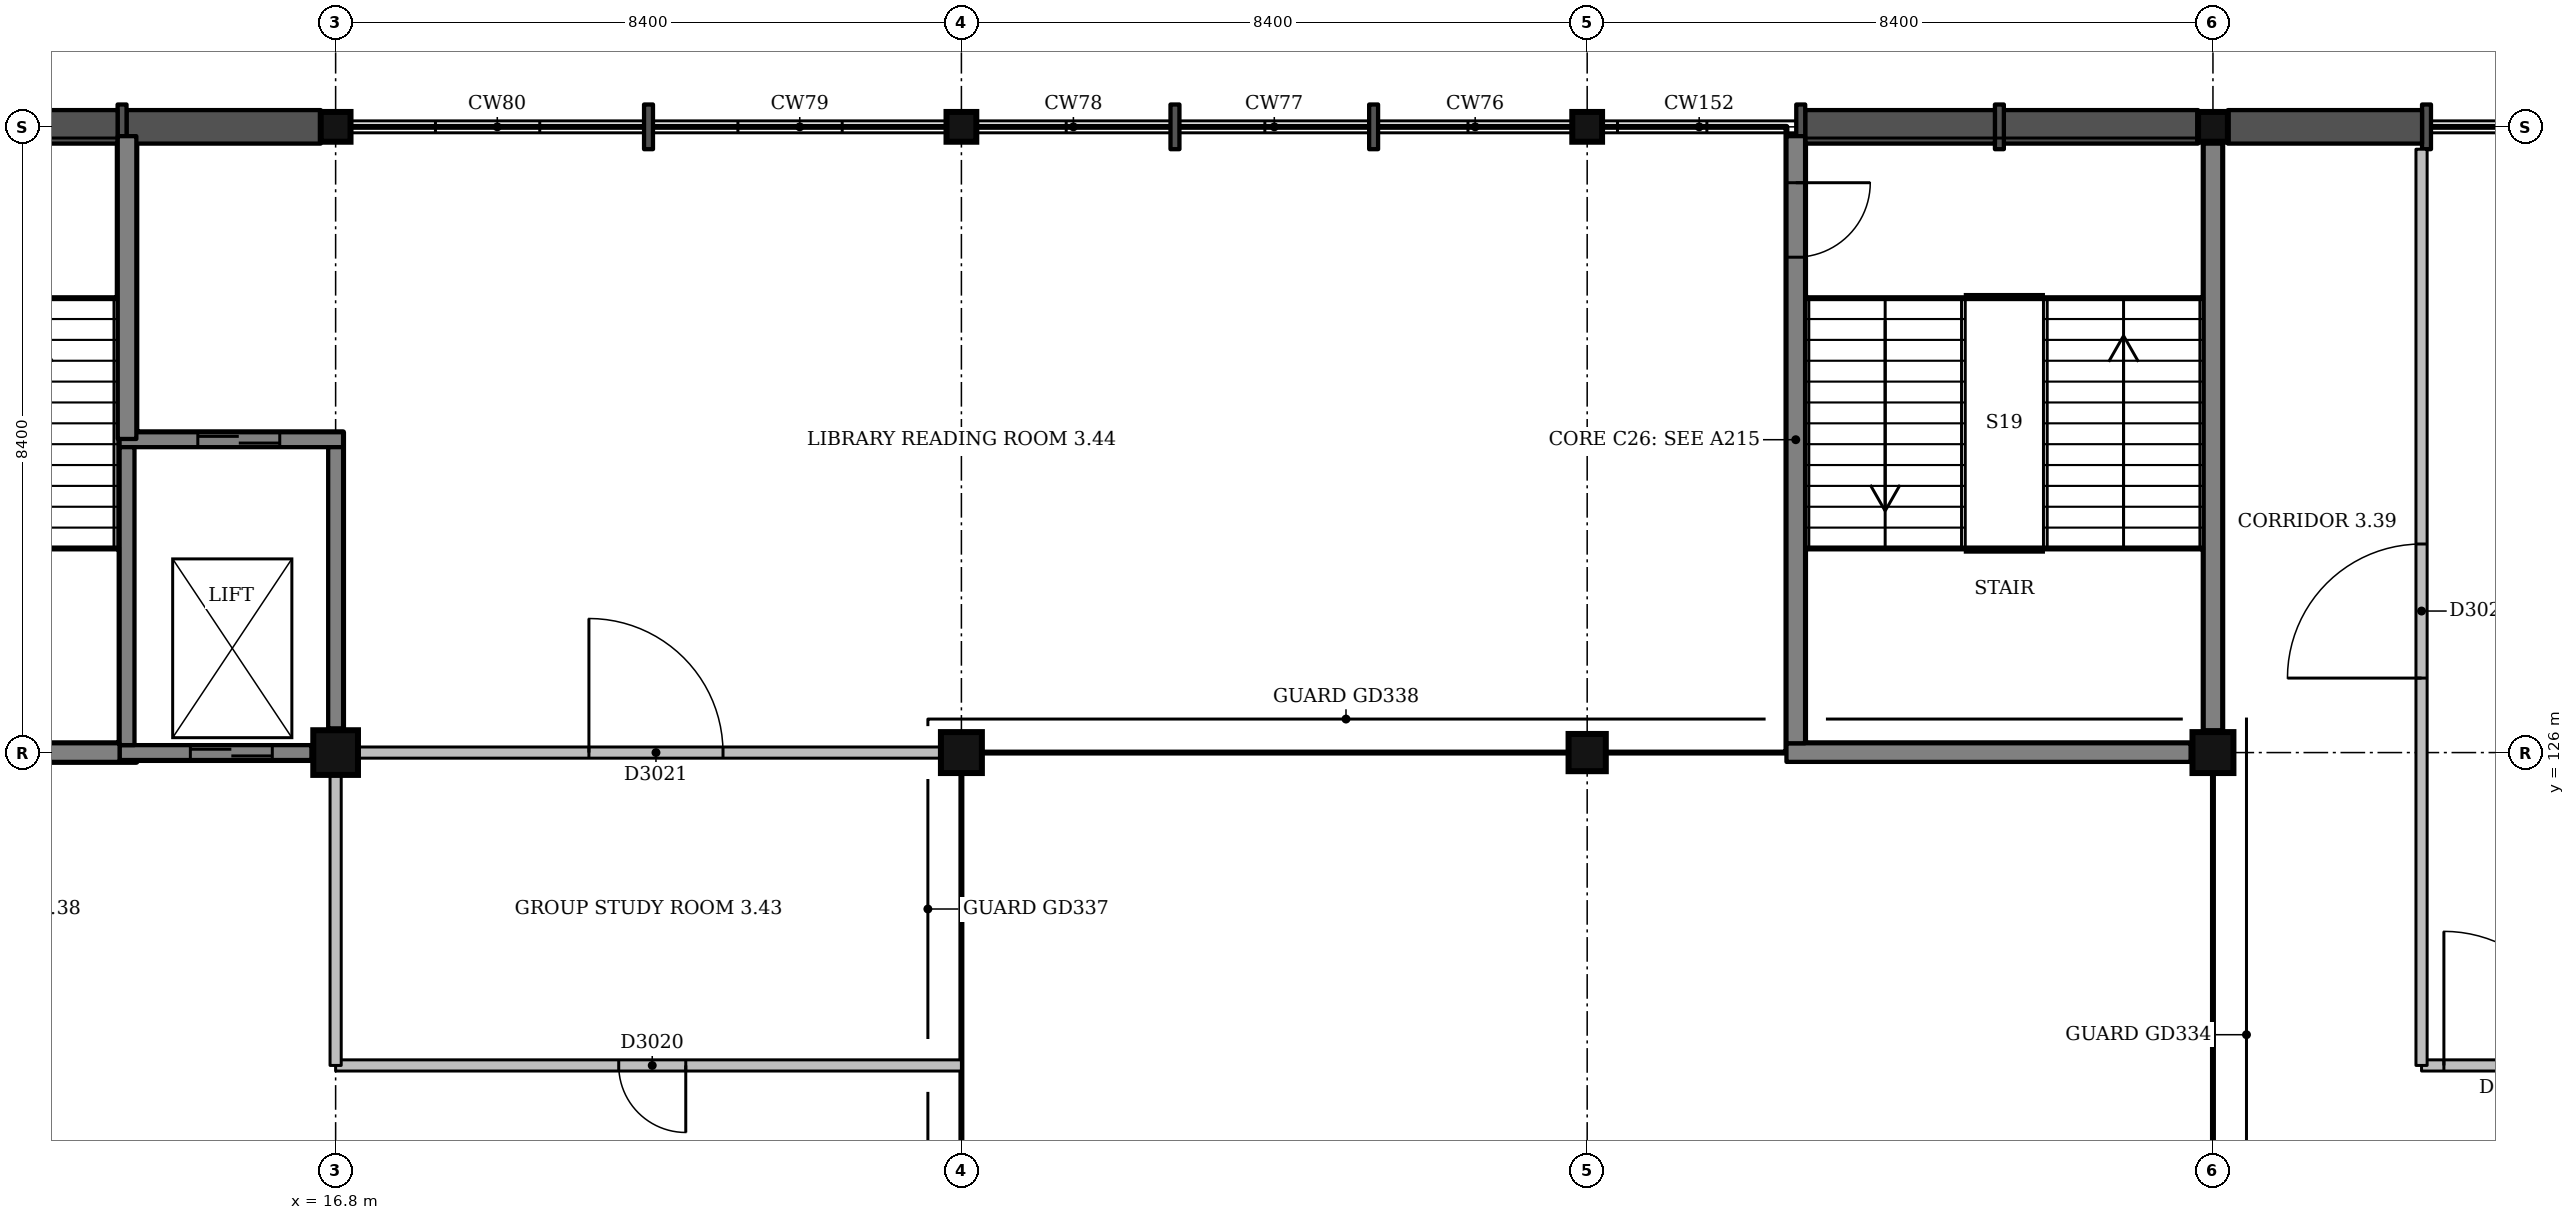
"""IFC4 building model, lengths in metres.
Left out: names, types, materials, properties, quantities, classifications, styles, units other than length and angle.
Written with IfcOpenShell. Run it as: python <this file> out.ifc"""

import sys

from ifc_helpers import new_model, si_unit, direction, frame, frame_2d, origin, origin_2d, place, context, subcontext, project, spatial, rectangle, extrude, element, fill, save


model = new_model("IFC4")
c1 = context("Model", 3, precision=1e-05, world=origin(), true_north=direction((0.0, 1.0)))
c2 = subcontext(c1, "Body", "Model", "MODEL_VIEW")
j1 = project(units=[si_unit("LENGTHUNIT", "METRE"), si_unit("PLANEANGLEUNIT", "RADIAN")], contexts=[c1])
p1 = place(None, origin())
s1 = spatial("IfcSite", under=j1, at=p1, CompositionType="ELEMENT")
p2 = place(p1, origin())
s2 = spatial("IfcBuilding", under=s1, at=p2, CompositionType="ELEMENT")
p3 = place(p2, frame((0.0, 0.0, 13.5)))
s3 = spatial("IfcBuildingStorey", under=s2, at=p3, CompositionType="ELEMENT", Elevation=13.5)
p4 = place(p3, frame((16.8, 126.0, 0.0), z_axis=(0.0, 0.0, 1.0), x_axis=(1.0, 0.0, 0.0)))
e1 = element("IfcColumn", 1, at=p4, inside=s3, PredefinedType="COLUMN", context=c2, shape_type="SweptSolid", body=[
    extrude(rectangle(XDim=0.6, YDim=0.6, at=origin_2d()), origin(), (0.0, 0.0, 1.0), 4.5),
])
p5 = place(p3, frame((16.8, 134.4, 0.0), z_axis=(0.0, 0.0, 1.0), x_axis=(1.0, 0.0, 0.0)))
e2 = element("IfcColumn", 2, at=p5, inside=s3, PredefinedType="COLUMN", context=c2, shape_type="SweptSolid", body=[
    extrude(rectangle(XDim=0.4, YDim=0.4, at=origin_2d()), origin(), (0.0, 0.0, 1.0), 4.5),
])
p6 = place(p3, frame((25.2, 126.0, 0.0), z_axis=(0.0, 0.0, 1.0), x_axis=(1.0, 0.0, 0.0)))
e3 = element("IfcColumn", 3, at=p6, inside=s3, PredefinedType="COLUMN", context=c2, shape_type="SweptSolid", body=[
    extrude(rectangle(XDim=0.55, YDim=0.55, at=origin_2d()), origin(), (0.0, 0.0, 1.0), 4.5),
])
p7 = place(p3, frame((25.2, 134.4, 0.0), z_axis=(0.0, 0.0, 1.0), x_axis=(1.0, 0.0, 0.0)))
e4 = element("IfcColumn", 4, at=p7, inside=s3, PredefinedType="COLUMN", context=c2, shape_type="SweptSolid", body=[
    extrude(rectangle(XDim=0.4, YDim=0.4, at=origin_2d()), origin(), (0.0, 0.0, 1.0), 4.5),
])
p8 = place(p3, frame((33.6, 126.0, 0.0), z_axis=(0.0, 0.0, 1.0), x_axis=(1.0, 0.0, 0.0)))
e5 = element("IfcColumn", 5, at=p8, inside=s3, PredefinedType="COLUMN", context=c2, shape_type="SweptSolid", body=[
    extrude(rectangle(XDim=0.5, YDim=0.5, at=origin_2d()), origin(), (0.0, 0.0, 1.0), 4.5),
])
p9 = place(p3, frame((33.6, 134.4, 0.0), z_axis=(0.0, 0.0, 1.0), x_axis=(1.0, 0.0, 0.0)))
e6 = element("IfcColumn", 6, at=p9, inside=s3, PredefinedType="COLUMN", context=c2, shape_type="SweptSolid", body=[
    extrude(rectangle(XDim=0.4, YDim=0.4, at=origin_2d()), origin(), (0.0, 0.0, 1.0), 4.5),
])
p10 = place(p3, frame((42.0, 126.0, 0.0), z_axis=(0.0, 0.0, 1.0), x_axis=(1.0, 0.0, 0.0)))
e7 = element("IfcColumn", 7, at=p10, inside=s3, PredefinedType="COLUMN", context=c2, shape_type="SweptSolid", body=[
    extrude(rectangle(XDim=0.55, YDim=0.55, at=origin_2d()), origin(), (0.0, 0.0, 1.0), 4.5),
])
p11 = place(p3, frame((42.0, 134.4, 0.0), z_axis=(0.0, 0.0, 1.0), x_axis=(1.0, 0.0, 0.0)))
e8 = element("IfcColumn", 8, at=p11, inside=s3, PredefinedType="COLUMN", context=c2, shape_type="SweptSolid", body=[
    extrude(rectangle(XDim=0.4, YDim=0.4, at=origin_2d()), origin(), (0.0, 0.0, 1.0), 4.5),
])
p12 = place(p3, frame((13.9, 126.0, 0.0), z_axis=(0.0, 0.0, 1.0), x_axis=(1.0, 0.0, 0.0)))
e9 = element("IfcWall", 9, at=p12, inside=s3, PredefinedType="SHEAR", context=c2, shape_type="SweptSolid", body=[
    extrude(rectangle(XDim=2.575, YDim=0.2, at=frame_2d((1.288, 0.0))), origin(), (0.0, 0.0, 1.0), 4.5),
])
p13 = place(p12, frame((0.95, 0.0, 0.0)))
e10 = element("IfcOpeningElement", 10, at=p13, cuts=e9, PredefinedType="OPENING", context=c2, shape_type="SweptSolid", body=[
    extrude(rectangle(XDim=1.1, YDim=2.1, at=frame_2d((0.55, 1.05))), frame((0.0, 0.11, 0.0), z_axis=(0.0, -1.0, 0.0), x_axis=(1.0, 0.0, 0.0)), (0.0, 0.0, 1.0), 0.22),
])
p14 = place(p3, frame((13.9, 130.2, 0.0), z_axis=(0.0, 0.0, 1.0), x_axis=(1.0, 0.0, 0.0)))
e11 = element("IfcWall", 11, at=p14, inside=s3, PredefinedType="SHEAR", context=c2, shape_type="SweptSolid", body=[
    extrude(rectangle(XDim=3.0, YDim=0.2, at=frame_2d((1.5, 0.0))), origin(), (0.0, 0.0, 1.0), 4.5),
])
p15 = place(p14, frame((1.05, 0.0, 0.0)))
e12 = element("IfcOpeningElement", 12, at=p15, cuts=e11, PredefinedType="OPENING", context=c2, shape_type="SweptSolid", body=[
    extrude(rectangle(XDim=1.1, YDim=2.1, at=frame_2d((0.55, 1.05))), frame((0.0, 0.11, 0.0), z_axis=(0.0, -1.0, 0.0), x_axis=(1.0, 0.0, 0.0)), (0.0, 0.0, 1.0), 0.22),
])
p16 = place(p3, frame((14.0, 126.1, 0.0), z_axis=(0.0, 0.0, 1.0), x_axis=(0.0, 1.0, 0.0)))
e13 = element("IfcWall", 13, at=p16, inside=s3, PredefinedType="SHEAR", context=c2, shape_type="SweptSolid", body=[
    extrude(rectangle(XDim=4.0, YDim=0.2, at=frame_2d((2.0, 0.0))), origin(), (0.0, 0.0, 1.0), 4.5),
])
p17 = place(p3, frame((16.8, 126.325, 0.0), z_axis=(0.0, 0.0, 1.0), x_axis=(0.0, 1.0, 0.0)))
e14 = element("IfcWall", 14, at=p17, inside=s3, PredefinedType="SHEAR", context=c2, shape_type="SweptSolid", body=[
    extrude(rectangle(XDim=3.775, YDim=0.2, at=frame_2d((1.888, 0.0))), origin(), (0.0, 0.0, 1.0), 4.5),
])
p18 = place(p3, frame((36.275, 126.0, 0.0), z_axis=(0.0, 0.0, 1.0), x_axis=(1.0, 0.0, 0.0)))
e15 = element("IfcWall", 15, at=p18, inside=s3, PredefinedType="SHEAR", context=c2, shape_type="SweptSolid", body=[
    extrude(rectangle(XDim=5.425, YDim=0.25, at=frame_2d((2.712, 0.0))), origin(), (0.0, 0.0, 1.0), 4.5),
])
p19 = place(p3, frame((36.4, 126.125, 0.0), z_axis=(0.0, 0.0, 1.0), x_axis=(0.0, 1.0, 0.0)))
e16 = element("IfcWall", 16, at=p19, inside=s3, PredefinedType="SHEAR", context=c2, shape_type="SweptSolid", body=[
    extrude(rectangle(XDim=8.15, YDim=0.25, at=frame_2d((4.075, 0.0))), origin(), (0.0, 0.0, 1.0), 4.5),
])
p20 = place(p19, frame((6.525, 0.0, 0.0)))
e17 = element("IfcOpeningElement", 17, at=p20, cuts=e16, PredefinedType="OPENING", context=c2, shape_type="SweptSolid", body=[
    extrude(rectangle(XDim=1.0, YDim=2.1, at=frame_2d((0.5, 1.05))), frame((0.0, 0.135, 0.0), z_axis=(0.0, -1.0, 0.0), x_axis=(1.0, 0.0, 0.0)), (0.0, 0.0, 1.0), 0.27),
])
p21 = place(p3, frame((42.0, 126.3, 0.0), z_axis=(0.0, 0.0, 1.0), x_axis=(0.0, 1.0, 0.0)))
e18 = element("IfcWall", 18, at=p21, inside=s3, PredefinedType="SHEAR", context=c2, shape_type="SweptSolid", body=[
    extrude(rectangle(XDim=7.875, YDim=0.25, at=frame_2d((3.938, 0.0))), origin(), (0.0, 0.0, 1.0), 4.5),
])
p22 = place(p3, frame((8.725, 126.0, 0.0), z_axis=(0.0, 0.0, 1.0), x_axis=(1.0, 0.0, 0.0)))
e19 = element("IfcWall", 19, at=p22, inside=s3, PredefinedType="SHEAR", context=c2, shape_type="SweptSolid", body=[
    extrude(rectangle(XDim=5.175, YDim=0.25, at=frame_2d((2.587, 0.0))), origin(), (0.0, 0.0, 1.0), 4.5),
])
p23 = place(p3, frame((14.0, 130.21, 0.0), z_axis=(0.0, 0.0, 1.0), x_axis=(0.0, 1.0, 0.0)))
e20 = element("IfcWall", 20, at=p23, inside=s3, PredefinedType="SHEAR", context=c2, shape_type="SweptSolid", body=[
    extrude(rectangle(XDim=4.065, YDim=0.25, at=frame_2d((2.032, 0.0))), origin(), (0.0, 0.0, 1.0), 4.5),
])
p24 = place(p3, frame((44.927, 134.4, 0.0), z_axis=(0.0, 0.0, 1.0), x_axis=(-1.0, 0.0, 0.0)))
e21 = element("IfcWall", 21, at=p24, inside=s3, PredefinedType="SOLIDWALL", context=c2, shape_type="SweptSolid", body=[
    extrude(rectangle(XDim=0.12, YDim=0.6, at=frame_2d((0.06, 0.0))), origin(), (0.0, 0.0, 1.0), 3.35),
])
for number, where, z_axis, x_axis in (
    (22, (44.807, 134.4, 0.0), (0.0, 0.0, 1.0), (-1.0, 0.0, 0.0)),
    (23, (41.8, 134.4, 0.0), (0.0, 0.0, 1.0), (-1.0, 0.0, 0.0)),
):
    element("IfcWall", number, at=place(p3, frame(where, z_axis=z_axis, x_axis=x_axis)), inside=s3, PredefinedType="SOLIDWALL", context=c2, shape_type="SweptSolid", body=[
        extrude(rectangle(XDim=2.607, YDim=0.45, at=frame_2d((1.303, 0.0))), origin(), (0.0, 0.0, 1.0), 3.35),
    ])
p25 = place(p3, frame((39.193, 134.4, 0.0), z_axis=(0.0, 0.0, 1.0), x_axis=(-1.0, 0.0, 0.0)))
e24 = element("IfcWall", 24, at=p25, inside=s3, PredefinedType="SOLIDWALL", context=c2, shape_type="SweptSolid", body=[
    extrude(rectangle(XDim=0.12, YDim=0.6, at=frame_2d((0.06, 0.0))), origin(), (0.0, 0.0, 1.0), 3.35),
])
p26 = place(p3, frame((39.073, 134.4, 0.0), z_axis=(0.0, 0.0, 1.0), x_axis=(-1.0, 0.0, 0.0)))
e25 = element("IfcWall", 25, at=p26, inside=s3, PredefinedType="SOLIDWALL", context=c2, shape_type="SweptSolid", body=[
    extrude(rectangle(XDim=2.547, YDim=0.45, at=frame_2d((1.273, 0.0))), origin(), (0.0, 0.0, 1.0), 3.35),
])
for number, where, z_axis, x_axis in (
    (26, (36.527, 134.4, 0.0), (0.0, 0.0, 1.0), (-1.0, 0.0, 0.0)),
    (27, (30.793, 134.4, 0.0), (0.0, 0.0, 1.0), (-1.0, 0.0, 0.0)),
):
    element("IfcWall", number, at=place(p3, frame(where, z_axis=z_axis, x_axis=x_axis)), inside=s3, PredefinedType="SOLIDWALL", context=c2, shape_type="SweptSolid", body=[
        extrude(rectangle(XDim=0.12, YDim=0.6, at=frame_2d((0.06, 0.0))), origin(), (0.0, 0.0, 1.0), 3.35),
    ])
for number, where, z_axis, x_axis in (
    (28, (28.127, 134.4, 0.0), (0.0, 0.0, 1.0), (-1.0, 0.0, 0.0)),
    (29, (21.06, 134.4, 0.0), (0.0, 0.0, 1.0), (-1.0, 0.0, 0.0)),
):
    element("IfcWall", number, at=place(p3, frame(where, z_axis=z_axis, x_axis=x_axis)), inside=s3, PredefinedType="SOLIDWALL", context=c2, shape_type="SweptSolid", body=[
        extrude(rectangle(XDim=0.12, YDim=0.6, at=frame_2d((0.06, 0.0))), origin(), (0.0, 0.0, 1.0), 3.35),
    ])
p27 = place(p3, frame((16.6, 134.4, 0.0), z_axis=(0.0, 0.0, 1.0), x_axis=(-1.0, 0.0, 0.0)))
e30 = element("IfcWall", 30, at=p27, inside=s3, PredefinedType="SOLIDWALL", context=c2, shape_type="SweptSolid", body=[
    extrude(rectangle(XDim=2.607, YDim=0.45, at=frame_2d((1.303, 0.0))), origin(), (0.0, 0.0, 1.0), 3.35),
])
p28 = place(p3, frame((13.993, 134.4, 0.0), z_axis=(0.0, 0.0, 1.0), x_axis=(-1.0, 0.0, 0.0)))
e31 = element("IfcWall", 31, at=p28, inside=s3, PredefinedType="SOLIDWALL", context=c2, shape_type="SweptSolid", body=[
    extrude(rectangle(XDim=0.12, YDim=0.6, at=frame_2d((0.06, 0.0))), origin(), (0.0, 0.0, 1.0), 3.35),
])
p29 = place(p3, frame((13.873, 134.4, 0.0), z_axis=(0.0, 0.0, 1.0), x_axis=(-1.0, 0.0, 0.0)))
e32 = element("IfcWall", 32, at=p29, inside=s3, PredefinedType="SOLIDWALL", context=c2, shape_type="SweptSolid", body=[
    extrude(rectangle(XDim=2.547, YDim=0.45, at=frame_2d((1.273, 0.0))), origin(), (0.0, 0.0, 1.0), 3.35),
])
p30 = place(p3, frame((16.8, 121.8, 0.0), z_axis=(0.0, 0.0, 1.0), x_axis=(1.0, 0.0, 0.0)))
e33 = element("IfcWall", 33, at=p30, inside=s3, PredefinedType="PARTITIONING", context=c2, shape_type="SweptSolid", body=[
    extrude(rectangle(XDim=8.4, YDim=0.15, at=frame_2d((4.2, 0.0))), origin(), (0.0, 0.0, 1.0), 3.4),
])
p31 = place(p30, frame((3.8, 0.0, 0.0)))
e34 = element("IfcOpeningElement", 34, at=p31, cuts=e33, PredefinedType="OPENING", context=c2, shape_type="SweptSolid", body=[
    extrude(rectangle(XDim=0.9, YDim=2.1, at=frame_2d((0.45, 1.05))), frame((0.0, 0.085, 0.0), z_axis=(0.0, -1.0, 0.0), x_axis=(1.0, 0.0, 0.0)), (0.0, 0.0, 1.0), 0.17),
])
p32 = place(p3, frame((44.8, 121.8, 0.0), z_axis=(0.0, 0.0, 1.0), x_axis=(1.0, 0.0, 0.0)))
e35 = element("IfcWall", 35, at=p32, inside=s3, PredefinedType="PARTITIONING", context=c2, shape_type="SweptSolid", body=[
    extrude(rectangle(XDim=28.0, YDim=0.15, at=frame_2d((14.0, 0.0))), origin(), (0.0, 0.0, 1.0), 3.35),
])
p33 = place(p32, frame((0.3, 0.0, 0.0)))
e36 = element("IfcOpeningElement", 36, at=p33, cuts=e35, PredefinedType="OPENING", context=c2, shape_type="SweptSolid", body=[
    extrude(rectangle(XDim=1.8, YDim=2.1, at=frame_2d((0.9, 1.05))), frame((0.0, 0.085, 0.0), z_axis=(0.0, -1.0, 0.0), x_axis=(1.0, 0.0, 0.0)), (0.0, 0.0, 1.0), 0.17),
])
p34 = place(p32, frame((20.25, 0.0, 0.0)))
e37 = element("IfcOpeningElement", 37, at=p34, cuts=e35, PredefinedType="OPENING", context=c2, shape_type="SweptSolid", body=[
    extrude(rectangle(XDim=1.8, YDim=2.1, at=frame_2d((0.9, 1.05))), frame((0.0, 0.085, 0.0), z_axis=(0.0, -1.0, 0.0), x_axis=(1.0, 0.0, 0.0)), (0.0, 0.0, 1.0), 0.17),
])
p35 = place(p3, frame((17.1, 126.0, 0.0), z_axis=(0.0, 0.0, 1.0), x_axis=(1.0, 0.0, 0.0)))
e38 = element("IfcWall", 38, at=p35, inside=s3, PredefinedType="PARTITIONING", context=c2, shape_type="SweptSolid", body=[
    extrude(rectangle(XDim=7.825, YDim=0.15, at=frame_2d((3.913, 0.0))), origin(), (0.0, 0.0, 1.0), 3.4),
])
p36 = place(p35, frame((3.1, 0.0, 0.0)))
e39 = element("IfcOpeningElement", 39, at=p36, cuts=e38, PredefinedType="OPENING", context=c2, shape_type="SweptSolid", body=[
    extrude(rectangle(XDim=1.8, YDim=2.1, at=frame_2d((0.9, 1.05))), frame((0.0, 0.085, 0.0), z_axis=(0.0, -1.0, 0.0), x_axis=(1.0, 0.0, 0.0)), (0.0, 0.0, 1.0), 0.17),
])
p37 = place(p3, frame((16.8, 121.8, 0.0), z_axis=(0.0, 0.0, 1.0), x_axis=(0.0, 1.0, 0.0)))
e40 = element("IfcWall", 40, at=p37, inside=s3, PredefinedType="PARTITIONING", context=c2, shape_type="SweptSolid", body=[
    extrude(rectangle(XDim=3.9, YDim=0.15, at=frame_2d((1.95, 0.0))), origin(), (0.0, 0.0, 1.0), 3.4),
])
p38 = place(p3, frame((44.8, 121.8, 0.0), z_axis=(0.0, 0.0, 1.0), x_axis=(0.0, 1.0, 0.0)))
e41 = element("IfcWall", 41, at=p38, inside=s3, PredefinedType="PARTITIONING", context=c2, shape_type="SweptSolid", body=[
    extrude(rectangle(XDim=12.3, YDim=0.15, at=frame_2d((6.15, 0.0))), origin(), (0.0, 0.0, 1.0), 3.4),
])
p39 = place(p38, frame((5.2, 0.0, 0.0)))
e42 = element("IfcOpeningElement", 42, at=p39, cuts=e41, PredefinedType="OPENING", context=c2, shape_type="SweptSolid", body=[
    extrude(rectangle(XDim=1.8, YDim=2.1, at=frame_2d((0.9, 1.05))), frame((0.0, 0.085, 0.0), z_axis=(0.0, -1.0, 0.0), x_axis=(1.0, 0.0, 0.0)), (0.0, 0.0, 1.0), 0.17),
])
p40 = place(p31, origin())
e43 = element("IfcDoor", 43, at=p40, inside=s3, OperationType="SINGLE_SWING_RIGHT", PredefinedType="DOOR", context=c2, shape_type="SweptSolid", body=[
    extrude(rectangle(XDim=0.9, YDim=2.1, at=frame_2d((0.45, 1.05))), frame((0.0, 0.025, 0.0), z_axis=(0.0, -1.0, 0.0), x_axis=(1.0, 0.0, 0.0)), (0.0, 0.0, 1.0), 0.05),
])
fill(e34, e43)
p41 = place(p36, origin())
e44 = element("IfcDoor", 44, at=p41, inside=s3, OperationType="DOUBLE_DOOR_SINGLE_SWING", PredefinedType="DOOR", context=c2, shape_type="SweptSolid", body=[
    extrude(rectangle(XDim=1.8, YDim=2.1, at=frame_2d((0.9, 1.05))), frame((0.0, 0.025, 0.0), z_axis=(0.0, -1.0, 0.0), x_axis=(1.0, 0.0, 0.0)), (0.0, 0.0, 1.0), 0.05),
])
fill(e39, e44)
p42 = place(p39, origin())
e45 = element("IfcDoor", 45, at=p42, inside=s3, OperationType="DOUBLE_DOOR_SINGLE_SWING", PredefinedType="DOOR", context=c2, shape_type="SweptSolid", body=[
    extrude(rectangle(XDim=1.8, YDim=2.1, at=frame_2d((0.9, 1.05))), frame((0.0, 0.025, 0.0), z_axis=(0.0, -1.0, 0.0), x_axis=(1.0, 0.0, 0.0)), (0.0, 0.0, 1.0), 0.05),
])
fill(e42, e45)
p43 = place(p33, origin())
e46 = element("IfcDoor", 46, at=p43, inside=s3, OperationType="DOUBLE_DOOR_SINGLE_SWING", PredefinedType="DOOR", context=c2, shape_type="SweptSolid", body=[
    extrude(rectangle(XDim=1.8, YDim=2.1, at=frame_2d((0.9, 1.05))), frame((0.0, 0.025, 0.0), z_axis=(0.0, -1.0, 0.0), x_axis=(1.0, 0.0, 0.0)), (0.0, 0.0, 1.0), 0.05),
])
fill(e36, e46)
p44 = place(p20, origin())
e47 = element("IfcDoor", 47, at=p44, inside=s3, OperationType="SINGLE_SWING_RIGHT", PredefinedType="DOOR", context=c2, shape_type="SweptSolid", body=[
    extrude(rectangle(XDim=1.0, YDim=2.1, at=frame_2d((0.5, 1.05))), frame((0.0, 0.025, 0.0), z_axis=(0.0, -1.0, 0.0), x_axis=(1.0, 0.0, 0.0)), (0.0, 0.0, 1.0), 0.05),
])
fill(e17, e47)
p45 = place(p13, origin())
e48 = element("IfcDoor", 48, at=p45, inside=s3, OperationType="SLIDING_TO_RIGHT", PredefinedType="DOOR", context=c2, shape_type="SweptSolid", body=[
    extrude(rectangle(XDim=1.1, YDim=2.1, at=frame_2d((0.55, 1.05))), frame((0.0, 0.025, 0.0), z_axis=(0.0, -1.0, 0.0), x_axis=(1.0, 0.0, 0.0)), (0.0, 0.0, 1.0), 0.05),
])
fill(e10, e48)
p46 = place(p15, origin())
e49 = element("IfcDoor", 49, at=p46, inside=s3, OperationType="SLIDING_TO_LEFT", PredefinedType="DOOR", context=c2, shape_type="SweptSolid", body=[
    extrude(rectangle(XDim=1.1, YDim=2.1, at=frame_2d((0.55, 1.05))), frame((0.0, 0.025, 0.0), z_axis=(0.0, -1.0, 0.0), x_axis=(1.0, 0.0, 0.0)), (0.0, 0.0, 1.0), 0.05),
])
fill(e12, e49)
save(model, sys.argv[1])
